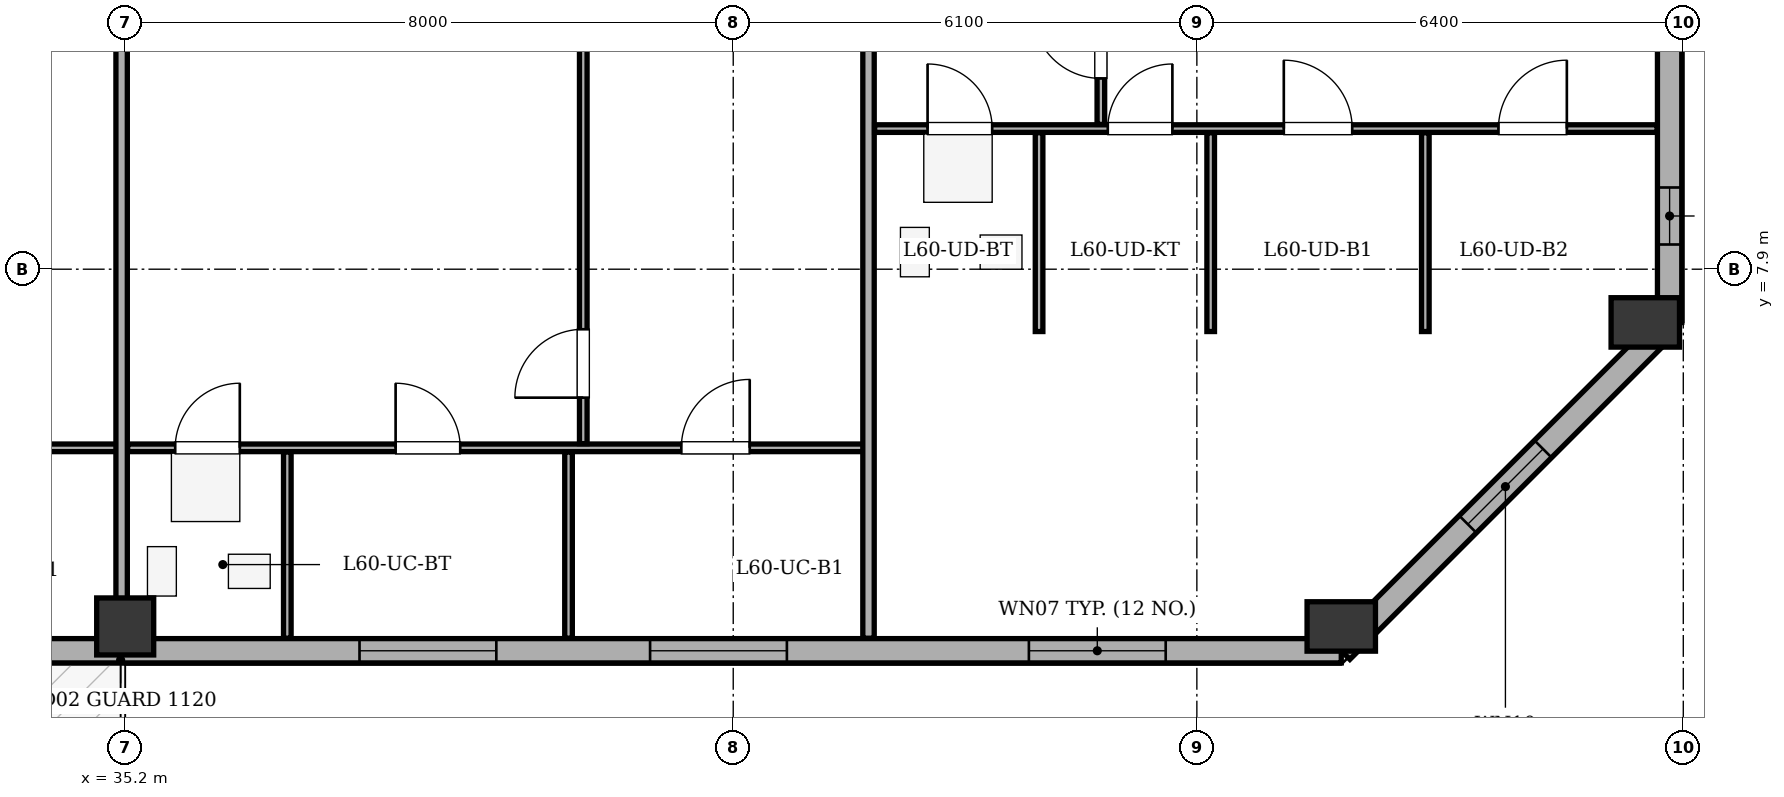
"""IFC4 building model, lengths in metres.
Left out: names, types, materials, properties, quantities, classifications, styles, units other than length and angle.
Written with IfcOpenShell. Run it as: python <this file> out.ifc"""

import sys

from ifc_helpers import new_model, si_unit, direction, frame, frame_2d, origin, origin_2d, place, context, subcontext, project, spatial, rectangle, extrude, element, fill, save


model = new_model("IFC4")
c1 = context("Model", 3, precision=1e-05, world=origin(), true_north=direction((0.0, 1.0)))
c2 = subcontext(c1, "Body", "Model", "MODEL_VIEW")
j1 = project(units=[si_unit("LENGTHUNIT", "METRE"), si_unit("PLANEANGLEUNIT", "RADIAN")], contexts=[c1])
p1 = place(None, origin())
s1 = spatial("IfcSite", under=j1, at=p1, CompositionType="ELEMENT")
p2 = place(p1, origin())
s2 = spatial("IfcBuilding", under=s1, at=p2, CompositionType="ELEMENT")
p3 = place(p2, frame((0.0, 0.0, 231.3)))
s3 = spatial("IfcBuildingStorey", under=s2, at=p3, CompositionType="ELEMENT", Elevation=231.3)
p4 = place(p3, frame((35.2, 3.2, 0.0), z_axis=(0.0, 0.0, 1.0), x_axis=(1.0, 0.0, 0.0)))
e1 = element("IfcColumn", 1, at=p4, inside=s3, PredefinedType="COLUMN", context=c2, shape_type="SweptSolid", body=[
    extrude(rectangle(XDim=0.75, YDim=0.75, at=origin_2d()), origin(), (0.0, 0.0, 1.0), 3.4),
])
for number, where, z_axis, x_axis in (
    (2, (51.2, 3.2, 0.0), (0.0, 0.0, 1.0), (1.0, 0.0, 0.0)),
    (3, (55.2, 7.2, 0.0), (0.0, 0.0, 1.0), (1.0, 0.0, 0.0)),
):
    element("IfcColumn", number, at=place(p3, frame(where, z_axis=z_axis, x_axis=x_axis)), inside=s3, PredefinedType="COLUMN", context=c2, shape_type="SweptSolid", body=[
        extrude(rectangle(XDim=0.65, YDim=0.9, at=origin_2d()), origin(), (0.0, 0.0, 1.0), 3.4),
    ])
p5 = place(p3, frame((51.2, 2.88, 0.0), z_axis=(0.0, 0.0, 1.0), x_axis=(-1.0, 0.0, 0.0)))
e4 = element("IfcWall", 4, at=p5, inside=s3, PredefinedType="STANDARD", context=c2, shape_type="SweptSolid", body=[
    extrude(rectangle(XDim=36.0, YDim=0.32, at=frame_2d((18.0, 0.0))), origin(), (0.0, 0.0, 1.0), 2.725),
])
p6 = place(p5, frame((18.9, 0.0, 0.0)))
e5 = element("IfcOpeningElement", 5, at=p6, cuts=e4, PredefinedType="OPENING", context=c2, shape_type="SweptSolid", body=[
    extrude(rectangle(XDim=1.0, YDim=2.02, at=frame_2d((0.5, 1.01))), frame((0.0, 0.17, 0.0), z_axis=(0.0, -1.0, 0.0), x_axis=(1.0, 0.0, 0.0)), (0.0, 0.0, 1.0), 0.34),
])
p7 = place(p5, frame((2.31, 0.0, 0.75)))
e6 = element("IfcOpeningElement", 6, at=p7, cuts=e4, PredefinedType="OPENING", context=c2, shape_type="SweptSolid", body=[
    extrude(rectangle(XDim=1.8, YDim=1.7, at=frame_2d((0.9, 0.85))), frame((0.0, 0.17, 0.0), z_axis=(0.0, -1.0, 0.0), x_axis=(1.0, 0.0, 0.0)), (0.0, 0.0, 1.0), 0.34),
])
p8 = place(p5, frame((7.294, 0.0, 0.75)))
e7 = element("IfcOpeningElement", 7, at=p8, cuts=e4, PredefinedType="OPENING", context=c2, shape_type="SweptSolid", body=[
    extrude(rectangle(XDim=1.8, YDim=1.7, at=frame_2d((0.9, 0.85))), frame((0.0, 0.17, 0.0), z_axis=(0.0, -1.0, 0.0), x_axis=(1.0, 0.0, 0.0)), (0.0, 0.0, 1.0), 0.34),
])
p9 = place(p5, frame((11.117, 0.0, 0.75)))
e8 = element("IfcOpeningElement", 8, at=p9, cuts=e4, PredefinedType="OPENING", context=c2, shape_type="SweptSolid", body=[
    extrude(rectangle(XDim=1.8, YDim=1.7, at=frame_2d((0.9, 0.85))), frame((0.0, 0.17, 0.0), z_axis=(0.0, -1.0, 0.0), x_axis=(1.0, 0.0, 0.0)), (0.0, 0.0, 1.0), 0.34),
])
p10 = place(p5, frame((27.473, 0.0, 0.75)))
e9 = element("IfcOpeningElement", 9, at=p10, cuts=e4, PredefinedType="OPENING", context=c2, shape_type="SweptSolid", body=[
    extrude(rectangle(XDim=1.8, YDim=1.7, at=frame_2d((0.9, 0.85))), frame((0.0, 0.17, 0.0), z_axis=(0.0, -1.0, 0.0), x_axis=(1.0, 0.0, 0.0)), (0.0, 0.0, 1.0), 0.34),
])
p11 = place(p5, frame((31.548, 0.0, 0.75)))
e10 = element("IfcOpeningElement", 10, at=p11, cuts=e4, PredefinedType="OPENING", context=c2, shape_type="SweptSolid", body=[
    extrude(rectangle(XDim=1.25, YDim=1.7, at=frame_2d((0.625, 0.85))), frame((0.0, 0.17, 0.0), z_axis=(0.0, -1.0, 0.0), x_axis=(1.0, 0.0, 0.0)), (0.0, 0.0, 1.0), 0.34),
])
p12 = place(p3, frame((55.52, 35.0, 0.0), z_axis=(0.0, 0.0, 1.0), x_axis=(0.0, -1.0, 0.0)))
e11 = element("IfcWall", 11, at=p12, inside=s3, PredefinedType="STANDARD", context=c2, shape_type="SweptSolid", body=[
    extrude(rectangle(XDim=27.8, YDim=0.32, at=frame_2d((13.9, 0.0))), origin(), (0.0, 0.0, 1.0), 2.725),
])
p13 = place(p12, frame((4.128, 0.0, 0.75)))
e12 = element("IfcOpeningElement", 12, at=p13, cuts=e11, PredefinedType="OPENING", context=c2, shape_type="SweptSolid", body=[
    extrude(rectangle(XDim=1.8, YDim=1.7, at=frame_2d((0.9, 0.85))), frame((0.0, 0.17, 0.0), z_axis=(0.0, -1.0, 0.0), x_axis=(1.0, 0.0, 0.0)), (0.0, 0.0, 1.0), 0.34),
])
p14 = place(p12, frame((9.472, 0.0, 0.75)))
e13 = element("IfcOpeningElement", 13, at=p14, cuts=e11, PredefinedType="OPENING", context=c2, shape_type="SweptSolid", body=[
    extrude(rectangle(XDim=2.2, YDim=1.7, at=frame_2d((1.1, 0.85))), frame((0.0, 0.17, 0.0), z_axis=(0.0, -1.0, 0.0), x_axis=(1.0, 0.0, 0.0)), (0.0, 0.0, 1.0), 0.34),
])
p15 = place(p12, frame((16.506, 0.0, 0.75)))
e14 = element("IfcOpeningElement", 14, at=p15, cuts=e11, PredefinedType="OPENING", context=c2, shape_type="SweptSolid", body=[
    extrude(rectangle(XDim=1.8, YDim=1.7, at=frame_2d((0.9, 0.85))), frame((0.0, 0.17, 0.0), z_axis=(0.0, -1.0, 0.0), x_axis=(1.0, 0.0, 0.0)), (0.0, 0.0, 1.0), 0.34),
])
p16 = place(p12, frame((21.069, 0.0, 0.75)))
e15 = element("IfcOpeningElement", 15, at=p16, cuts=e11, PredefinedType="OPENING", context=c2, shape_type="SweptSolid", body=[
    extrude(rectangle(XDim=2.2, YDim=1.7, at=frame_2d((1.1, 0.85))), frame((0.0, 0.17, 0.0), z_axis=(0.0, -1.0, 0.0), x_axis=(1.0, 0.0, 0.0)), (0.0, 0.0, 1.0), 0.34),
])
p17 = place(p12, frame((26.025, 0.0, 0.75)))
e16 = element("IfcOpeningElement", 16, at=p17, cuts=e11, PredefinedType="OPENING", context=c2, shape_type="SweptSolid", body=[
    extrude(rectangle(XDim=0.75, YDim=1.45, at=frame_2d((0.375, 0.725))), frame((0.0, 0.17, 0.0), z_axis=(0.0, -1.0, 0.0), x_axis=(1.0, 0.0, 0.0)), (0.0, 0.0, 1.0), 0.34),
])
p18 = place(p3, frame((55.52, 7.2, 0.0), z_axis=(0.0, 0.0, 1.0), x_axis=(-0.707106781187, -0.707106781187, 0.0)))
e17 = element("IfcWall", 17, at=p18, inside=s3, PredefinedType="STANDARD", context=c2, shape_type="SweptSolid", body=[
    extrude(rectangle(XDim=6.11, YDim=0.32, at=frame_2d((3.055, 0.0))), origin(), (0.0, 0.0, 1.0), 2.725),
])
p19 = place(p18, frame((2.355, 0.0, 0.75)))
e18 = element("IfcOpeningElement", 18, at=p19, cuts=e17, PredefinedType="OPENING", context=c2, shape_type="SweptSolid", body=[
    extrude(rectangle(XDim=1.4, YDim=1.65, at=frame_2d((0.7, 0.825))), frame((0.0, 0.17, 0.0), z_axis=(0.0, -1.0, 0.0), x_axis=(1.0, 0.0, 0.0)), (0.0, 0.0, 1.0), 0.34),
])
p20 = place(p3, frame((24.81, 5.55, 0.0), z_axis=(0.0, 0.0, 1.0), x_axis=(1.0, 0.0, 0.0)))
e19 = element("IfcWall", 19, at=p20, inside=s3, PredefinedType="PARTITIONING", context=c2, shape_type="SweptSolid", body=[
    extrude(rectangle(XDim=10.383, YDim=0.1, at=frame_2d((5.191, 0.0))), origin(), (0.0, 0.0, 1.0), 3.1),
])
p21 = place(p20, frame((0.625, 0.0, 0.0)))
e20 = element("IfcOpeningElement", 20, at=p21, cuts=e19, PredefinedType="OPENING", context=c2, shape_type="SweptSolid", body=[
    extrude(rectangle(XDim=0.85, YDim=2.05, at=frame_2d((0.425, 1.025))), frame((0.0, 0.06, 0.0), z_axis=(0.0, -1.0, 0.0), x_axis=(1.0, 0.0, 0.0)), (0.0, 0.0, 1.0), 0.12),
])
p22 = place(p20, frame((3.704, 0.0, 0.0)))
e21 = element("IfcOpeningElement", 21, at=p22, cuts=e19, PredefinedType="OPENING", context=c2, shape_type="SweptSolid", body=[
    extrude(rectangle(XDim=0.85, YDim=2.05, at=frame_2d((0.425, 1.025))), frame((0.0, 0.06, 0.0), z_axis=(0.0, -1.0, 0.0), x_axis=(1.0, 0.0, 0.0)), (0.0, 0.0, 1.0), 0.12),
])
p23 = place(p20, frame((7.761, 0.0, 0.0)))
e22 = element("IfcOpeningElement", 22, at=p23, cuts=e19, PredefinedType="OPENING", context=c2, shape_type="SweptSolid", body=[
    extrude(rectangle(XDim=0.9, YDim=2.05, at=frame_2d((0.45, 1.025))), frame((0.0, 0.06, 0.0), z_axis=(0.0, -1.0, 0.0), x_axis=(1.0, 0.0, 0.0)), (0.0, 0.0, 1.0), 0.12),
])
p24 = place(p3, frame((35.153, 3.045, 0.0), z_axis=(0.0, 0.0, 1.0), x_axis=(0.0, 1.0, 0.0)))
e23 = element("IfcWall", 23, at=p24, inside=s3, PredefinedType="PARTITIONING", context=c2, shape_type="SweptSolid", body=[
    extrude(rectangle(XDim=15.255, YDim=0.15, at=frame_2d((7.627, 0.0))), origin(), (0.0, 0.0, 1.0), 2.535),
])
p25 = place(p3, frame((35.233, 5.55, 0.0), z_axis=(0.0, 0.0, 1.0), x_axis=(1.0, 0.0, 0.0)))
e24 = element("IfcWall", 24, at=p25, inside=s3, PredefinedType="PARTITIONING", context=c2, shape_type="SweptSolid", body=[
    extrude(rectangle(XDim=9.787, YDim=0.1, at=frame_2d((4.894, 0.0))), origin(), (0.0, 0.0, 1.0), 3.1),
])
p26 = place(p25, frame((0.625, 0.0, 0.0)))
e25 = element("IfcOpeningElement", 25, at=p26, cuts=e24, PredefinedType="OPENING", context=c2, shape_type="SweptSolid", body=[
    extrude(rectangle(XDim=0.85, YDim=2.05, at=frame_2d((0.425, 1.025))), frame((0.0, 0.06, 0.0), z_axis=(0.0, -1.0, 0.0), x_axis=(1.0, 0.0, 0.0)), (0.0, 0.0, 1.0), 0.12),
])
p27 = place(p25, frame((3.525, 0.0, 0.0)))
e26 = element("IfcOpeningElement", 26, at=p27, cuts=e24, PredefinedType="OPENING", context=c2, shape_type="SweptSolid", body=[
    extrude(rectangle(XDim=0.85, YDim=2.05, at=frame_2d((0.425, 1.025))), frame((0.0, 0.06, 0.0), z_axis=(0.0, -1.0, 0.0), x_axis=(1.0, 0.0, 0.0)), (0.0, 0.0, 1.0), 0.12),
])
p28 = place(p25, frame((7.284, 0.0, 0.0)))
e27 = element("IfcOpeningElement", 27, at=p28, cuts=e24, PredefinedType="OPENING", context=c2, shape_type="SweptSolid", body=[
    extrude(rectangle(XDim=0.9, YDim=2.05, at=frame_2d((0.45, 1.025))), frame((0.0, 0.06, 0.0), z_axis=(0.0, -1.0, 0.0), x_axis=(1.0, 0.0, 0.0)), (0.0, 0.0, 1.0), 0.12),
])
p29 = place(p3, frame((41.227, 5.605, 0.0), z_axis=(0.0, 0.0, 1.0), x_axis=(0.0, 1.0, 0.0)))
e28 = element("IfcWall", 28, at=p29, inside=s3, PredefinedType="PARTITIONING", context=c2, shape_type="SweptSolid", body=[
    extrude(rectangle(XDim=12.695, YDim=0.1, at=frame_2d((6.348, 0.0))), origin(), (0.0, 0.0, 1.0), 3.1),
])
p30 = place(p29, frame((0.605, 0.0, 0.0)))
e29 = element("IfcOpeningElement", 29, at=p30, cuts=e28, PredefinedType="OPENING", context=c2, shape_type="SweptSolid", body=[
    extrude(rectangle(XDim=0.9, YDim=2.05, at=frame_2d((0.45, 1.025))), frame((0.0, 0.06, 0.0), z_axis=(0.0, -1.0, 0.0), x_axis=(1.0, 0.0, 0.0)), (0.0, 0.0, 1.0), 0.12),
])
for number, where, z_axis, x_axis in (
    (30, (37.333, 3.045, 0.0), (0.0, 0.0, 1.0), (0.0, 1.0, 0.0)),
    (31, (41.033, 3.045, 0.0), (0.0, 0.0, 1.0), (0.0, 1.0, 0.0)),
):
    element("IfcWall", number, at=place(p3, frame(where, z_axis=z_axis, x_axis=x_axis)), inside=s3, PredefinedType="PARTITIONING", context=c2, shape_type="SweptSolid", body=[
        extrude(rectangle(XDim=2.45, YDim=0.1, at=frame_2d((1.225, 0.0))), origin(), (0.0, 0.0, 1.0), 3.1),
    ])
p31 = place(p3, frame((44.98, 3.045, 0.0), z_axis=(0.0, 0.0, 1.0), x_axis=(0.0, 1.0, 0.0)))
e32 = element("IfcWall", 32, at=p31, inside=s3, PredefinedType="PARTITIONING", context=c2, shape_type="SweptSolid", body=[
    extrude(rectangle(XDim=15.255, YDim=0.15, at=frame_2d((7.627, 0.0))), origin(), (0.0, 0.0, 1.0), 2.725),
])
p32 = place(p3, frame((45.06, 9.75, 0.0), z_axis=(0.0, 0.0, 1.0), x_axis=(1.0, 0.0, 0.0)))
e33 = element("IfcWall", 33, at=p32, inside=s3, PredefinedType="PARTITIONING", context=c2, shape_type="SweptSolid", body=[
    extrude(rectangle(XDim=10.295, YDim=0.1, at=frame_2d((5.147, 0.0))), origin(), (0.0, 0.0, 1.0), 3.1),
])
p33 = place(p32, frame((0.697, 0.0, 0.0)))
e34 = element("IfcOpeningElement", 34, at=p33, cuts=e33, PredefinedType="OPENING", context=c2, shape_type="SweptSolid", body=[
    extrude(rectangle(XDim=0.85, YDim=2.05, at=frame_2d((0.425, 1.025))), frame((0.0, 0.06, 0.0), z_axis=(0.0, -1.0, 0.0), x_axis=(1.0, 0.0, 0.0)), (0.0, 0.0, 1.0), 0.12),
])
p34 = place(p32, frame((3.068, 0.0, 0.0)))
e35 = element("IfcOpeningElement", 35, at=p34, cuts=e33, PredefinedType="OPENING", context=c2, shape_type="SweptSolid", body=[
    extrude(rectangle(XDim=0.85, YDim=2.05, at=frame_2d((0.425, 1.025))), frame((0.0, 0.06, 0.0), z_axis=(0.0, -1.0, 0.0), x_axis=(1.0, 0.0, 0.0)), (0.0, 0.0, 1.0), 0.12),
])
p35 = place(p32, frame((5.384, 0.0, 0.0)))
e36 = element("IfcOpeningElement", 36, at=p35, cuts=e33, PredefinedType="OPENING", context=c2, shape_type="SweptSolid", body=[
    extrude(rectangle(XDim=0.9, YDim=2.05, at=frame_2d((0.45, 1.025))), frame((0.0, 0.06, 0.0), z_axis=(0.0, -1.0, 0.0), x_axis=(1.0, 0.0, 0.0)), (0.0, 0.0, 1.0), 0.12),
])
p36 = place(p32, frame((8.208, 0.0, 0.0)))
e37 = element("IfcOpeningElement", 37, at=p36, cuts=e33, PredefinedType="OPENING", context=c2, shape_type="SweptSolid", body=[
    extrude(rectangle(XDim=0.9, YDim=2.05, at=frame_2d((0.45, 1.025))), frame((0.0, 0.06, 0.0), z_axis=(0.0, -1.0, 0.0), x_axis=(1.0, 0.0, 0.0)), (0.0, 0.0, 1.0), 0.12),
])
p37 = place(p3, frame((48.037, 9.805, 0.0), z_axis=(0.0, 0.0, 1.0), x_axis=(0.0, 1.0, 0.0)))
e38 = element("IfcWall", 38, at=p37, inside=s3, PredefinedType="PARTITIONING", context=c2, shape_type="SweptSolid", body=[
    extrude(rectangle(XDim=27.065, YDim=0.1, at=frame_2d((13.533, 0.0))), origin(), (0.0, 0.0, 1.0), 3.1),
])
p38 = place(p37, frame((0.605, 0.0, 0.0)))
e39 = element("IfcOpeningElement", 39, at=p38, cuts=e38, PredefinedType="OPENING", context=c2, shape_type="SweptSolid", body=[
    extrude(rectangle(XDim=0.9, YDim=2.05, at=frame_2d((0.45, 1.025))), frame((0.0, 0.06, 0.0), z_axis=(0.0, -1.0, 0.0), x_axis=(1.0, 0.0, 0.0)), (0.0, 0.0, 1.0), 0.12),
])
for number, where, z_axis, x_axis in (
    (40, (47.224, 7.08, 0.0), (0.0, 0.0, 1.0), (0.0, 1.0, 0.0)),
    (41, (49.482, 7.08, 0.0), (0.0, 0.0, 1.0), (0.0, 1.0, 0.0)),
):
    element("IfcWall", number, at=place(p3, frame(where, z_axis=z_axis, x_axis=x_axis)), inside=s3, PredefinedType="PARTITIONING", context=c2, shape_type="SweptSolid", body=[
        extrude(rectangle(XDim=2.615, YDim=0.1, at=frame_2d((1.308, 0.0))), origin(), (0.0, 0.0, 1.0), 2.725),
    ])
p39 = place(p3, frame((52.306, 7.08, 0.0), z_axis=(0.0, 0.0, 1.0), x_axis=(0.0, 1.0, 0.0)))
e42 = element("IfcWall", 42, at=p39, inside=s3, PredefinedType="PARTITIONING", context=c2, shape_type="SweptSolid", body=[
    extrude(rectangle(XDim=2.615, YDim=0.1, at=frame_2d((1.308, 0.0))), origin(), (0.0, 0.0, 1.0), 3.1),
])
p40 = place(p7, origin())
e43 = element("IfcWindow", 43, at=p40, inside=s3, PartitioningType="SINGLE_PANEL", PredefinedType="WINDOW", context=c2, shape_type="SweptSolid", body=[
    extrude(rectangle(XDim=1.8, YDim=1.7, at=frame_2d((0.9, 0.85))), frame((0.0, -0.01, 0.0), z_axis=(0.0, -1.0, 0.0), x_axis=(1.0, 0.0, 0.0)), (0.0, 0.0, 1.0), 0.06),
])
fill(e6, e43)
p41 = place(p8, origin())
e44 = element("IfcWindow", 44, at=p41, inside=s3, PartitioningType="SINGLE_PANEL", PredefinedType="WINDOW", context=c2, shape_type="SweptSolid", body=[
    extrude(rectangle(XDim=1.8, YDim=1.7, at=frame_2d((0.9, 0.85))), frame((0.0, -0.01, 0.0), z_axis=(0.0, -1.0, 0.0), x_axis=(1.0, 0.0, 0.0)), (0.0, 0.0, 1.0), 0.06),
])
fill(e7, e44)
p42 = place(p9, origin())
e45 = element("IfcWindow", 45, at=p42, inside=s3, PartitioningType="SINGLE_PANEL", PredefinedType="WINDOW", context=c2, shape_type="SweptSolid", body=[
    extrude(rectangle(XDim=1.8, YDim=1.7, at=frame_2d((0.9, 0.85))), frame((0.0, -0.01, 0.0), z_axis=(0.0, -1.0, 0.0), x_axis=(1.0, 0.0, 0.0)), (0.0, 0.0, 1.0), 0.06),
])
fill(e8, e45)
p43 = place(p17, origin())
e46 = element("IfcWindow", 46, at=p43, inside=s3, PartitioningType="SINGLE_PANEL", PredefinedType="WINDOW", context=c2, shape_type="SweptSolid", body=[
    extrude(rectangle(XDim=0.75, YDim=1.45, at=frame_2d((0.375, 0.725))), frame((0.0, -0.01, 0.0), z_axis=(0.0, -1.0, 0.0), x_axis=(1.0, 0.0, 0.0)), (0.0, 0.0, 1.0), 0.06),
])
fill(e16, e46)
p44 = place(p19, origin())
e47 = element("IfcWindow", 47, at=p44, inside=s3, PartitioningType="SINGLE_PANEL", PredefinedType="WINDOW", context=c2, shape_type="SweptSolid", body=[
    extrude(rectangle(XDim=1.4, YDim=1.65, at=frame_2d((0.7, 0.825))), frame((0.0, -0.01, 0.0), z_axis=(0.0, -1.0, 0.0), x_axis=(1.0, 0.0, 0.0)), (0.0, 0.0, 1.0), 0.06),
])
fill(e18, e47)
p45 = place(p30, origin())
e48 = element("IfcDoor", 48, at=p45, inside=s3, OperationType="SINGLE_SWING_LEFT", PredefinedType="DOOR", context=c2, shape_type="SweptSolid", body=[
    extrude(rectangle(XDim=0.9, YDim=2.05, at=frame_2d((0.45, 1.025))), frame((0.0, 0.025, 0.0), z_axis=(0.0, -1.0, 0.0), x_axis=(1.0, 0.0, 0.0)), (0.0, 0.0, 1.0), 0.05),
])
fill(e29, e48)
p46 = place(p26, origin())
e49 = element("IfcDoor", 49, at=p46, inside=s3, OperationType="SINGLE_SWING_RIGHT", PredefinedType="DOOR", context=c2, shape_type="SweptSolid", body=[
    extrude(rectangle(XDim=0.85, YDim=2.05, at=frame_2d((0.425, 1.025))), frame((0.0, 0.025, 0.0), z_axis=(0.0, -1.0, 0.0), x_axis=(1.0, 0.0, 0.0)), (0.0, 0.0, 1.0), 0.05),
])
fill(e25, e49)
p47 = place(p27, origin())
e50 = element("IfcDoor", 50, at=p47, inside=s3, OperationType="SINGLE_SWING_LEFT", PredefinedType="DOOR", context=c2, shape_type="SweptSolid", body=[
    extrude(rectangle(XDim=0.85, YDim=2.05, at=frame_2d((0.425, 1.025))), frame((0.0, 0.025, 0.0), z_axis=(0.0, -1.0, 0.0), x_axis=(1.0, 0.0, 0.0)), (0.0, 0.0, 1.0), 0.05),
])
fill(e26, e50)
p48 = place(p28, origin())
e51 = element("IfcDoor", 51, at=p48, inside=s3, OperationType="SINGLE_SWING_RIGHT", PredefinedType="DOOR", context=c2, shape_type="SweptSolid", body=[
    extrude(rectangle(XDim=0.9, YDim=2.05, at=frame_2d((0.45, 1.025))), frame((0.0, 0.025, 0.0), z_axis=(0.0, -1.0, 0.0), x_axis=(1.0, 0.0, 0.0)), (0.0, 0.0, 1.0), 0.05),
])
fill(e27, e51)
p49 = place(p38, origin())
e52 = element("IfcDoor", 52, at=p49, inside=s3, OperationType="SINGLE_SWING_RIGHT", PredefinedType="DOOR", context=c2, shape_type="SweptSolid", body=[
    extrude(rectangle(XDim=0.9, YDim=2.05, at=frame_2d((0.45, 1.025))), frame((0.0, 0.025, 0.0), z_axis=(0.0, -1.0, 0.0), x_axis=(1.0, 0.0, 0.0)), (0.0, 0.0, 1.0), 0.05),
])
fill(e39, e52)
p50 = place(p33, origin())
e53 = element("IfcDoor", 53, at=p50, inside=s3, OperationType="SINGLE_SWING_LEFT", PredefinedType="DOOR", context=c2, shape_type="SweptSolid", body=[
    extrude(rectangle(XDim=0.85, YDim=2.05, at=frame_2d((0.425, 1.025))), frame((0.0, 0.025, 0.0), z_axis=(0.0, -1.0, 0.0), x_axis=(1.0, 0.0, 0.0)), (0.0, 0.0, 1.0), 0.05),
])
fill(e34, e53)
p51 = place(p34, origin())
e54 = element("IfcDoor", 54, at=p51, inside=s3, OperationType="SINGLE_SWING_RIGHT", PredefinedType="DOOR", context=c2, shape_type="SweptSolid", body=[
    extrude(rectangle(XDim=0.85, YDim=2.05, at=frame_2d((0.425, 1.025))), frame((0.0, 0.025, 0.0), z_axis=(0.0, -1.0, 0.0), x_axis=(1.0, 0.0, 0.0)), (0.0, 0.0, 1.0), 0.05),
])
fill(e35, e54)
p52 = place(p35, origin())
e55 = element("IfcDoor", 55, at=p52, inside=s3, OperationType="SINGLE_SWING_LEFT", PredefinedType="DOOR", context=c2, shape_type="SweptSolid", body=[
    extrude(rectangle(XDim=0.9, YDim=2.05, at=frame_2d((0.45, 1.025))), frame((0.0, 0.025, 0.0), z_axis=(0.0, -1.0, 0.0), x_axis=(1.0, 0.0, 0.0)), (0.0, 0.0, 1.0), 0.05),
])
fill(e36, e55)
p53 = place(p36, origin())
e56 = element("IfcDoor", 56, at=p53, inside=s3, OperationType="SINGLE_SWING_RIGHT", PredefinedType="DOOR", context=c2, shape_type="SweptSolid", body=[
    extrude(rectangle(XDim=0.9, YDim=2.05, at=frame_2d((0.45, 1.025))), frame((0.0, 0.025, 0.0), z_axis=(0.0, -1.0, 0.0), x_axis=(1.0, 0.0, 0.0)), (0.0, 0.0, 1.0), 0.05),
])
fill(e37, e56)
save(model, sys.argv[1])
